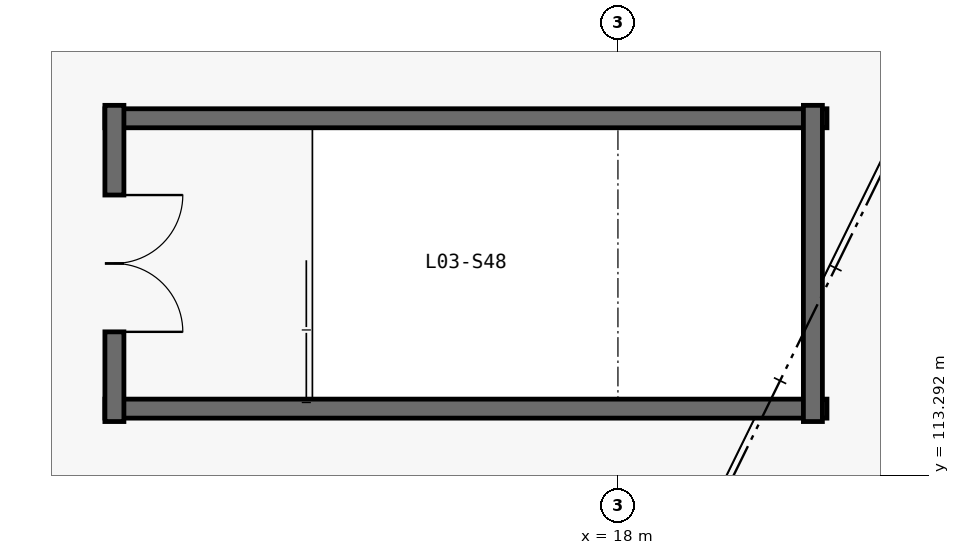
"""IFC4 building model, lengths in metres.
Left out: names, types, materials, properties, quantities, classifications, styles, units other than length and angle.
Written with IfcOpenShell. Run it as: python <this file> out.ifc"""

import sys

from ifc_helpers import new_model, si_unit, direction, frame, frame_2d, origin, place, context, subcontext, project, spatial, rectangle, extrude, element, fill, save


model = new_model("IFC4")
c1 = context("Model", 3, precision=1e-05, world=origin(), true_north=direction((0.0, 1.0)))
c2 = subcontext(c1, "Body", "Model", "MODEL_VIEW")
j1 = project(units=[si_unit("LENGTHUNIT", "METRE"), si_unit("PLANEANGLEUNIT", "RADIAN")], contexts=[c1])
p1 = place(None, origin())
s1 = spatial("IfcSite", under=j1, at=p1, CompositionType="ELEMENT")
p2 = place(p1, origin())
s2 = spatial("IfcBuilding", under=s1, at=p2, CompositionType="ELEMENT")
p3 = place(p2, frame((0.0, 0.0, 15.0)))
s3 = spatial("IfcBuildingStorey", under=s2, at=p3, CompositionType="ELEMENT", Elevation=15.0)
for number, where, z_axis, x_axis in (
    (1, (11.25, 114.17, 0.0), (0.0, 0.0, 1.0), (1.0, 0.0, 0.0)),
    (2, (20.75, 117.99, 0.0), (0.0, 0.0, 1.0), (-1.0, 0.0, 0.0)),
):
    element("IfcWall", number, at=place(p3, frame(where, z_axis=z_axis, x_axis=x_axis)), inside=s3, PredefinedType="SHEAR", context=c2, shape_type="SweptSolid", body=[
        extrude(rectangle(XDim=9.5, YDim=0.25, at=frame_2d((4.75, 0.0))), origin(), (0.0, 0.0, 1.0), 4.54),
    ])
p4 = place(p3, frame((11.375, 118.16, 0.0), z_axis=(0.0, 0.0, 1.0), x_axis=(0.0, -1.0, 0.0)))
e3 = element("IfcWall", 3, at=p4, inside=s3, PredefinedType="SHEAR", context=c2, shape_type="SweptSolid", body=[
    extrude(rectangle(XDim=4.16, YDim=0.25, at=frame_2d((2.08, 0.0))), origin(), (0.0, 0.0, 1.0), 4.54),
])
p5 = place(p4, frame((1.18, 0.0, 0.0)))
e4 = element("IfcOpeningElement", 4, at=p5, cuts=e3, PredefinedType="OPENING", context=c2, shape_type="SweptSolid", body=[
    extrude(rectangle(XDim=1.8, YDim=2.25, at=frame_2d((0.9, 1.125))), frame((0.0, 0.135, 0.0), z_axis=(0.0, -1.0, 0.0), x_axis=(1.0, 0.0, 0.0)), (0.0, 0.0, 1.0), 0.27),
])
p6 = place(p3, frame((20.565, 114.0, 0.0), z_axis=(0.0, 0.0, 1.0), x_axis=(0.0, 1.0, 0.0)))
e5 = element("IfcWall", 5, at=p6, inside=s3, PredefinedType="SHEAR", context=c2, shape_type="SweptSolid", body=[
    extrude(rectangle(XDim=4.16, YDim=0.25, at=frame_2d((2.08, 0.0))), origin(), (0.0, 0.0, 1.0), 4.54),
])
p7 = place(p5, origin())
e6 = element("IfcDoor", 6, at=p7, inside=s3, OperationType="DOUBLE_DOOR_SINGLE_SWING", PredefinedType="DOOR", context=c2, shape_type="SweptSolid", body=[
    extrude(rectangle(XDim=1.8, YDim=2.25, at=frame_2d((0.9, 1.125))), frame((0.0, 0.025, 0.0), z_axis=(0.0, -1.0, 0.0), x_axis=(1.0, 0.0, 0.0)), (0.0, 0.0, 1.0), 0.05),
])
fill(e4, e6)
save(model, sys.argv[1])
